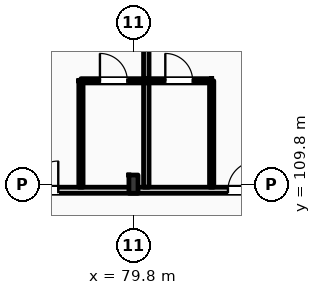
"""IFC4 building model, lengths in metres.
Left out: names, types, materials, properties, quantities, classifications, styles, units other than length and angle.
Written with IfcOpenShell. Run it as: python <this file> out.ifc"""

import sys

from ifc_helpers import new_model, si_unit, direction, frame, frame_2d, origin, origin_2d, place, context, subcontext, project, spatial, rectangle, i_section, extrude, element, fill, save


model = new_model("IFC4")
c1 = context("Model", 3, precision=1e-05, world=origin(), true_north=direction((0.0, 1.0)))
c2 = subcontext(c1, "Body", "Model", "MODEL_VIEW")
j1 = project(units=[si_unit("LENGTHUNIT", "METRE"), si_unit("PLANEANGLEUNIT", "RADIAN")], contexts=[c1])
p1 = place(None, origin())
s1 = spatial("IfcSite", under=j1, at=p1, CompositionType="ELEMENT")
p2 = place(p1, origin())
s2 = spatial("IfcBuilding", under=s1, at=p2, CompositionType="ELEMENT")
p3 = place(p2, frame((0.0, 0.0, 16.2)))
s3 = spatial("IfcBuildingStorey", under=s2, at=p3, CompositionType="ELEMENT", Elevation=16.2)
p4 = place(p3, frame((79.8, 109.8, 0.0), z_axis=(0.0, 0.0, 1.0), x_axis=(1.0, 0.0, 0.0)))
e1 = element("IfcColumn", 1, at=p4, inside=s3, PredefinedType="COLUMN", context=c2, shape_type="SweptSolid", body=[
    extrude(i_section(OverallWidth=0.3, OverallDepth=0.6, WebThickness=0.015, FlangeThickness=0.03, FilletRadius=0.027, at=origin_2d()), origin(), (0.0, 0.0, 1.0), 4.2),
])
p5 = place(p3, frame((10.65, 109.6, 0.0), z_axis=(0.0, 0.0, 1.0), x_axis=(1.0, 0.0, 0.0)))
e2 = element("IfcWall", 2, at=p5, inside=s3, PredefinedType="PARTITIONING", context=c2, shape_type="SweptSolid", body=[
    extrude(rectangle(XDim=109.21, YDim=0.2, at=frame_2d((54.605, 0.0))), origin(), (0.0, 0.0, 1.0), 3.36),
])
p6 = place(p5, frame((15.43, 0.0, 0.0)))
e3 = element("IfcOpeningElement", 3, at=p6, cuts=e2, PredefinedType="OPENING", context=c2, shape_type="SweptSolid", body=[
    extrude(rectangle(XDim=1.02, YDim=2.2, at=frame_2d((0.51, 1.1))), frame((0.0, 0.11, 0.0), z_axis=(0.0, -1.0, 0.0), x_axis=(1.0, 0.0, 0.0)), (0.0, 0.0, 1.0), 0.22),
])
p7 = place(p5, frame((19.537, 0.0, 0.0)))
e4 = element("IfcOpeningElement", 4, at=p7, cuts=e2, PredefinedType="OPENING", context=c2, shape_type="SweptSolid", body=[
    extrude(rectangle(XDim=1.02, YDim=2.2, at=frame_2d((0.51, 1.1))), frame((0.0, 0.11, 0.0), z_axis=(0.0, -1.0, 0.0), x_axis=(1.0, 0.0, 0.0)), (0.0, 0.0, 1.0), 0.22),
])
p8 = place(p5, frame((23.928, 0.0, 0.0)))
e5 = element("IfcOpeningElement", 5, at=p8, cuts=e2, PredefinedType="OPENING", context=c2, shape_type="SweptSolid", body=[
    extrude(rectangle(XDim=1.02, YDim=2.2, at=frame_2d((0.51, 1.1))), frame((0.0, 0.11, 0.0), z_axis=(0.0, -1.0, 0.0), x_axis=(1.0, 0.0, 0.0)), (0.0, 0.0, 1.0), 0.22),
])
p9 = place(p5, frame((26.169, 0.0, 0.0)))
e6 = element("IfcOpeningElement", 6, at=p9, cuts=e2, PredefinedType="OPENING", context=c2, shape_type="SweptSolid", body=[
    extrude(rectangle(XDim=1.02, YDim=2.2, at=frame_2d((0.51, 1.1))), frame((0.0, 0.11, 0.0), z_axis=(0.0, -1.0, 0.0), x_axis=(1.0, 0.0, 0.0)), (0.0, 0.0, 1.0), 0.22),
])
p10 = place(p5, frame((32.739, 0.0, 0.0)))
e7 = element("IfcOpeningElement", 7, at=p10, cuts=e2, PredefinedType="OPENING", context=c2, shape_type="SweptSolid", body=[
    extrude(rectangle(XDim=0.96, YDim=2.2, at=frame_2d((0.48, 1.1))), frame((0.0, 0.11, 0.0), z_axis=(0.0, -1.0, 0.0), x_axis=(1.0, 0.0, 0.0)), (0.0, 0.0, 1.0), 0.22),
])
p11 = place(p5, frame((34.98, 0.0, 0.0)))
e8 = element("IfcOpeningElement", 8, at=p11, cuts=e2, PredefinedType="OPENING", context=c2, shape_type="SweptSolid", body=[
    extrude(rectangle(XDim=0.96, YDim=2.2, at=frame_2d((0.48, 1.1))), frame((0.0, 0.11, 0.0), z_axis=(0.0, -1.0, 0.0), x_axis=(1.0, 0.0, 0.0)), (0.0, 0.0, 1.0), 0.22),
])
p12 = place(p5, frame((41.521, 0.0, 0.0)))
e9 = element("IfcOpeningElement", 9, at=p12, cuts=e2, PredefinedType="OPENING", context=c2, shape_type="SweptSolid", body=[
    extrude(rectangle(XDim=0.96, YDim=2.2, at=frame_2d((0.48, 1.1))), frame((0.0, 0.11, 0.0), z_axis=(0.0, -1.0, 0.0), x_axis=(1.0, 0.0, 0.0)), (0.0, 0.0, 1.0), 0.22),
])
p13 = place(p5, frame((43.512, 0.0, 0.0)))
e10 = element("IfcOpeningElement", 10, at=p13, cuts=e2, PredefinedType="OPENING", context=c2, shape_type="SweptSolid", body=[
    extrude(rectangle(XDim=0.96, YDim=2.2, at=frame_2d((0.48, 1.1))), frame((0.0, 0.11, 0.0), z_axis=(0.0, -1.0, 0.0), x_axis=(1.0, 0.0, 0.0)), (0.0, 0.0, 1.0), 0.22),
])
p14 = place(p5, frame((50.303, 0.0, 0.0)))
e11 = element("IfcOpeningElement", 11, at=p14, cuts=e2, PredefinedType="OPENING", context=c2, shape_type="SweptSolid", body=[
    extrude(rectangle(XDim=0.96, YDim=2.2, at=frame_2d((0.48, 1.1))), frame((0.0, 0.11, 0.0), z_axis=(0.0, -1.0, 0.0), x_axis=(1.0, 0.0, 0.0)), (0.0, 0.0, 1.0), 0.22),
])
p15 = place(p5, frame((54.944, 0.0, 0.0)))
e12 = element("IfcOpeningElement", 12, at=p15, cuts=e2, PredefinedType="OPENING", context=c2, shape_type="SweptSolid", body=[
    extrude(rectangle(XDim=0.96, YDim=2.2, at=frame_2d((0.48, 1.1))), frame((0.0, 0.11, 0.0), z_axis=(0.0, -1.0, 0.0), x_axis=(1.0, 0.0, 0.0)), (0.0, 0.0, 1.0), 0.22),
])
p16 = place(p5, frame((59.085, 0.0, 0.0)))
e13 = element("IfcOpeningElement", 13, at=p16, cuts=e2, PredefinedType="OPENING", context=c2, shape_type="SweptSolid", body=[
    extrude(rectangle(XDim=0.96, YDim=2.2, at=frame_2d((0.48, 1.1))), frame((0.0, 0.11, 0.0), z_axis=(0.0, -1.0, 0.0), x_axis=(1.0, 0.0, 0.0)), (0.0, 0.0, 1.0), 0.22),
])
p17 = place(p5, frame((63.476, 0.0, 0.0)))
e14 = element("IfcOpeningElement", 14, at=p17, cuts=e2, PredefinedType="OPENING", context=c2, shape_type="SweptSolid", body=[
    extrude(rectangle(XDim=0.96, YDim=2.2, at=frame_2d((0.48, 1.1))), frame((0.0, 0.11, 0.0), z_axis=(0.0, -1.0, 0.0), x_axis=(1.0, 0.0, 0.0)), (0.0, 0.0, 1.0), 0.22),
])
p18 = place(p5, frame((65.716, 0.0, 0.0)))
e15 = element("IfcOpeningElement", 15, at=p18, cuts=e2, PredefinedType="OPENING", context=c2, shape_type="SweptSolid", body=[
    extrude(rectangle(XDim=0.96, YDim=2.2, at=frame_2d((0.48, 1.1))), frame((0.0, 0.11, 0.0), z_axis=(0.0, -1.0, 0.0), x_axis=(1.0, 0.0, 0.0)), (0.0, 0.0, 1.0), 0.22),
])
p19 = place(p5, frame((72.257, 0.0, 0.0)))
e16 = element("IfcOpeningElement", 16, at=p19, cuts=e2, PredefinedType="OPENING", context=c2, shape_type="SweptSolid", body=[
    extrude(rectangle(XDim=0.96, YDim=2.2, at=frame_2d((0.48, 1.1))), frame((0.0, 0.11, 0.0), z_axis=(0.0, -1.0, 0.0), x_axis=(1.0, 0.0, 0.0)), (0.0, 0.0, 1.0), 0.22),
])
p20 = place(p5, frame((74.498, 0.0, 0.0)))
e17 = element("IfcOpeningElement", 17, at=p20, cuts=e2, PredefinedType="OPENING", context=c2, shape_type="SweptSolid", body=[
    extrude(rectangle(XDim=0.96, YDim=2.2, at=frame_2d((0.48, 1.1))), frame((0.0, 0.11, 0.0), z_axis=(0.0, -1.0, 0.0), x_axis=(1.0, 0.0, 0.0)), (0.0, 0.0, 1.0), 0.22),
])
p21 = place(p5, frame((81.039, 0.0, 0.0)))
e18 = element("IfcOpeningElement", 18, at=p21, cuts=e2, PredefinedType="OPENING", context=c2, shape_type="SweptSolid", body=[
    extrude(rectangle(XDim=0.96, YDim=2.2, at=frame_2d((0.48, 1.1))), frame((0.0, 0.11, 0.0), z_axis=(0.0, -1.0, 0.0), x_axis=(1.0, 0.0, 0.0)), (0.0, 0.0, 1.0), 0.22),
])
p22 = place(p5, frame((85.68, 0.0, 0.0)))
e19 = element("IfcOpeningElement", 19, at=p22, cuts=e2, PredefinedType="OPENING", context=c2, shape_type="SweptSolid", body=[
    extrude(rectangle(XDim=0.96, YDim=2.2, at=frame_2d((0.48, 1.1))), frame((0.0, 0.11, 0.0), z_axis=(0.0, -1.0, 0.0), x_axis=(1.0, 0.0, 0.0)), (0.0, 0.0, 1.0), 0.22),
])
p23 = place(p5, frame((89.82, 0.0, 0.0)))
e20 = element("IfcOpeningElement", 20, at=p23, cuts=e2, PredefinedType="OPENING", context=c2, shape_type="SweptSolid", body=[
    extrude(rectangle(XDim=0.96, YDim=2.2, at=frame_2d((0.48, 1.1))), frame((0.0, 0.11, 0.0), z_axis=(0.0, -1.0, 0.0), x_axis=(1.0, 0.0, 0.0)), (0.0, 0.0, 1.0), 0.22),
])
p24 = place(p5, frame((94.211, 0.0, 0.0)))
e21 = element("IfcOpeningElement", 21, at=p24, cuts=e2, PredefinedType="OPENING", context=c2, shape_type="SweptSolid", body=[
    extrude(rectangle(XDim=0.96, YDim=2.2, at=frame_2d((0.48, 1.1))), frame((0.0, 0.11, 0.0), z_axis=(0.0, -1.0, 0.0), x_axis=(1.0, 0.0, 0.0)), (0.0, 0.0, 1.0), 0.22),
])
p25 = place(p5, frame((98.602, 0.0, 0.0)))
e22 = element("IfcOpeningElement", 22, at=p25, cuts=e2, PredefinedType="OPENING", context=c2, shape_type="SweptSolid", body=[
    extrude(rectangle(XDim=0.96, YDim=2.2, at=frame_2d((0.48, 1.1))), frame((0.0, 0.11, 0.0), z_axis=(0.0, -1.0, 0.0), x_axis=(1.0, 0.0, 0.0)), (0.0, 0.0, 1.0), 0.22),
])
p26 = place(p5, frame((102.993, 0.0, 0.0)))
e23 = element("IfcOpeningElement", 23, at=p26, cuts=e2, PredefinedType="OPENING", context=c2, shape_type="SweptSolid", body=[
    extrude(rectangle(XDim=0.96, YDim=2.2, at=frame_2d((0.48, 1.1))), frame((0.0, 0.11, 0.0), z_axis=(0.0, -1.0, 0.0), x_axis=(1.0, 0.0, 0.0)), (0.0, 0.0, 1.0), 0.22),
])
p27 = place(p5, frame((105.269, 0.0, 0.0)))
e24 = element("IfcOpeningElement", 24, at=p27, cuts=e2, PredefinedType="OPENING", context=c2, shape_type="SweptSolid", body=[
    extrude(rectangle(XDim=0.96, YDim=2.2, at=frame_2d((0.48, 1.1))), frame((0.0, 0.11, 0.0), z_axis=(0.0, -1.0, 0.0), x_axis=(1.0, 0.0, 0.0)), (0.0, 0.0, 1.0), 0.22),
])
p28 = place(p5, frame((2.716, 0.0, 0.0)))
e25 = element("IfcOpeningElement", 25, at=p28, cuts=e2, PredefinedType="OPENING", context=c2, shape_type="SweptSolid", body=[
    extrude(rectangle(XDim=1.35, YDim=2.25, at=frame_2d((0.675, 1.125))), frame((0.0, 0.11, 0.0), z_axis=(0.0, -1.0, 0.0), x_axis=(1.0, 0.0, 0.0)), (0.0, 0.0, 1.0), 0.22),
])
p29 = place(p5, frame((6.65, 0.0, 0.0)))
e26 = element("IfcOpeningElement", 26, at=p29, cuts=e2, PredefinedType="OPENING", context=c2, shape_type="SweptSolid", body=[
    extrude(rectangle(XDim=1.35, YDim=2.25, at=frame_2d((0.675, 1.125))), frame((0.0, 0.11, 0.0), z_axis=(0.0, -1.0, 0.0), x_axis=(1.0, 0.0, 0.0)), (0.0, 0.0, 1.0), 0.22),
])
p30 = place(p5, frame((10.583, 0.0, 0.0)))
e27 = element("IfcOpeningElement", 27, at=p30, cuts=e2, PredefinedType="OPENING", context=c2, shape_type="SweptSolid", body=[
    extrude(rectangle(XDim=1.35, YDim=2.25, at=frame_2d((0.675, 1.125))), frame((0.0, 0.11, 0.0), z_axis=(0.0, -1.0, 0.0), x_axis=(1.0, 0.0, 0.0)), (0.0, 0.0, 1.0), 0.22),
])
p31 = place(p3, frame((80.222, 109.7, 0.0), z_axis=(0.0, 0.0, 1.0), x_axis=(0.0, 1.0, 0.0)))
e28 = element("IfcWall", 28, at=p31, inside=s3, PredefinedType="PARTITIONING", context=c2, shape_type="SweptSolid", body=[
    extrude(rectangle(XDim=8.15, YDim=0.18, at=frame_2d((4.075, 0.0))), origin(), (0.0, 0.0, 1.0), 3.92),
])
p32 = place(p3, frame((78.072, 109.7, 0.0), z_axis=(0.0, 0.0, 1.0), x_axis=(0.0, 1.0, 0.0)))
e29 = element("IfcWall", 29, at=p32, inside=s3, PredefinedType="PARTITIONING", context=c2, shape_type="SweptSolid", body=[
    extrude(rectangle(XDim=3.5, YDim=0.14, at=frame_2d((1.75, 0.0))), origin(), (0.0, 0.0, 1.0), 3.92),
])
p33 = place(p3, frame((78.072, 113.2, 0.0), z_axis=(0.0, 0.0, 1.0), x_axis=(1.0, 0.0, 0.0)))
e30 = element("IfcWall", 30, at=p33, inside=s3, PredefinedType="PARTITIONING", context=c2, shape_type="SweptSolid", body=[
    extrude(rectangle(XDim=2.15, YDim=0.14, at=frame_2d((1.075, 0.0))), origin(), (0.0, 0.0, 1.0), 3.92),
])
p34 = place(p33, frame((0.625, 0.0, 0.0)))
e31 = element("IfcOpeningElement", 31, at=p34, cuts=e30, PredefinedType="OPENING", context=c2, shape_type="SweptSolid", body=[
    extrude(rectangle(XDim=0.9, YDim=2.1, at=frame_2d((0.45, 1.05))), frame((0.0, 0.08, 0.0), z_axis=(0.0, -1.0, 0.0), x_axis=(1.0, 0.0, 0.0)), (0.0, 0.0, 1.0), 0.16),
])
p35 = place(p3, frame((82.372, 109.7, 0.0), z_axis=(0.0, 0.0, 1.0), x_axis=(0.0, 1.0, 0.0)))
e32 = element("IfcWall", 32, at=p35, inside=s3, PredefinedType="PARTITIONING", context=c2, shape_type="SweptSolid", body=[
    extrude(rectangle(XDim=3.5, YDim=0.14, at=frame_2d((1.75, 0.0))), origin(), (0.0, 0.0, 1.0), 3.61),
])
p36 = place(p3, frame((80.222, 113.2, 0.0), z_axis=(0.0, 0.0, 1.0), x_axis=(1.0, 0.0, 0.0)))
e33 = element("IfcWall", 33, at=p36, inside=s3, PredefinedType="PARTITIONING", context=c2, shape_type="SweptSolid", body=[
    extrude(rectangle(XDim=2.15, YDim=0.14, at=frame_2d((1.075, 0.0))), origin(), (0.0, 0.0, 1.0), 3.92),
])
p37 = place(p36, frame((0.625, 0.0, 0.0)))
e34 = element("IfcOpeningElement", 34, at=p37, cuts=e33, PredefinedType="OPENING", context=c2, shape_type="SweptSolid", body=[
    extrude(rectangle(XDim=0.9, YDim=2.1, at=frame_2d((0.45, 1.05))), frame((0.0, 0.08, 0.0), z_axis=(0.0, -1.0, 0.0), x_axis=(1.0, 0.0, 0.0)), (0.0, 0.0, 1.0), 0.16),
])
p38 = place(p18, origin())
e35 = element("IfcDoor", 35, at=p38, inside=s3, OperationType="SINGLE_SWING_RIGHT", PredefinedType="DOOR", context=c2, shape_type="SweptSolid", body=[
    extrude(rectangle(XDim=0.96, YDim=2.2, at=frame_2d((0.48, 1.1))), frame((0.0, 0.025, 0.0), z_axis=(0.0, -1.0, 0.0), x_axis=(1.0, 0.0, 0.0)), (0.0, 0.0, 1.0), 0.05),
])
fill(e15, e35)
p39 = place(p34, origin())
e36 = element("IfcDoor", 36, at=p39, inside=s3, OperationType="SINGLE_SWING_LEFT", PredefinedType="DOOR", context=c2, shape_type="SweptSolid", body=[
    extrude(rectangle(XDim=0.9, YDim=2.1, at=frame_2d((0.45, 1.05))), frame((0.0, 0.025, 0.0), z_axis=(0.0, -1.0, 0.0), x_axis=(1.0, 0.0, 0.0)), (0.0, 0.0, 1.0), 0.05),
])
fill(e31, e36)
p40 = place(p19, origin())
e37 = element("IfcDoor", 37, at=p40, inside=s3, OperationType="SINGLE_SWING_RIGHT", PredefinedType="DOOR", context=c2, shape_type="SweptSolid", body=[
    extrude(rectangle(XDim=0.96, YDim=2.2, at=frame_2d((0.48, 1.1))), frame((0.0, 0.025, 0.0), z_axis=(0.0, -1.0, 0.0), x_axis=(1.0, 0.0, 0.0)), (0.0, 0.0, 1.0), 0.05),
])
fill(e16, e37)
p41 = place(p37, origin())
e38 = element("IfcDoor", 38, at=p41, inside=s3, OperationType="SINGLE_SWING_LEFT", PredefinedType="DOOR", context=c2, shape_type="SweptSolid", body=[
    extrude(rectangle(XDim=0.9, YDim=2.1, at=frame_2d((0.45, 1.05))), frame((0.0, 0.025, 0.0), z_axis=(0.0, -1.0, 0.0), x_axis=(1.0, 0.0, 0.0)), (0.0, 0.0, 1.0), 0.05),
])
fill(e34, e38)
save(model, sys.argv[1])
